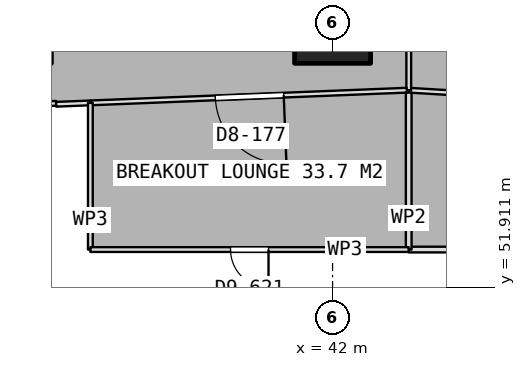
"""IFC4 building model, lengths in metres.
Left out: names, types, materials, properties, quantities, classifications, styles, units other than length and angle.
Written with IfcOpenShell. Run it as: python <this file> out.ifc"""

import sys

from ifc_helpers import new_model, si_unit, direction, frame, frame_2d, origin, origin_2d, place, context, subcontext, project, spatial, rectangle, extrude, element, fill, save


model = new_model("IFC4")
c1 = context("Model", 3, precision=1e-05, world=origin(), true_north=direction((0.0, 1.0)))
c2 = subcontext(c1, "Body", "Model", "MODEL_VIEW")
j1 = project(units=[si_unit("LENGTHUNIT", "METRE"), si_unit("PLANEANGLEUNIT", "RADIAN")], contexts=[c1])
p1 = place(None, origin())
s1 = spatial("IfcSite", under=j1, at=p1, CompositionType="ELEMENT")
p2 = place(p1, origin())
s2 = spatial("IfcBuilding", under=s1, at=p2, CompositionType="ELEMENT")
p3 = place(p2, frame((0.0, 0.0, 151.55)))
s3 = spatial("IfcBuildingStorey", under=s2, at=p3, CompositionType="ELEMENT", Elevation=151.55)
p4 = place(p3, frame((42.0, 58.8, 0.0), z_axis=(0.0, 0.0, 1.0), x_axis=(1.0, 0.0, 0.0)))
e1 = element("IfcColumn", 1, at=p4, inside=s3, PredefinedType="COLUMN", context=c2, shape_type="SweptSolid", body=[
    extrude(rectangle(XDim=2.0, YDim=2.0, at=origin_2d()), origin(), (0.0, 0.0, 1.0), 3.75),
])
p5 = place(p3, frame((51.643, 56.634, 0.0), z_axis=(0.0, 0.0, 1.0), x_axis=(-0.998199883252, 0.059974937057, 0.0)))
e2 = element("IfcWall", 2, at=p5, inside=s3, PredefinedType="PARTITIONING", context=c2, shape_type="SweptSolid", body=[
    extrude(rectangle(XDim=7.653, YDim=0.125, at=frame_2d((3.826, 0.0))), origin(), (0.0, 0.0, 1.0), 3.5),
])
p6 = place(p5, frame((3.326, 0.0, 0.0)))
e3 = element("IfcOpeningElement", 3, at=p6, cuts=e2, PredefinedType="OPENING", context=c2, shape_type="SweptSolid", body=[
    extrude(rectangle(XDim=1.0, YDim=2.1, at=frame_2d((0.5, 1.05))), frame((0.0, 0.073, 0.0), z_axis=(0.0, -1.0, 0.0), x_axis=(1.0, 0.0, 0.0)), (0.0, 0.0, 1.0), 0.145),
])
p7 = place(p3, frame((44.004, 57.093, 0.0), z_axis=(0.0, 0.0, 1.0), x_axis=(0.0, 1.0, 0.0)))
e4 = element("IfcWall", 4, at=p7, inside=s3, PredefinedType="PARTITIONING", context=c2, shape_type="SweptSolid", body=[
    extrude(rectangle(XDim=4.726, YDim=0.125, at=frame_2d((2.363, 0.0))), origin(), (0.0, 0.0, 1.0), 3.5),
])
p8 = place(p3, frame((53.2, 52.9, 0.0), z_axis=(0.0, 0.0, 1.0), x_axis=(-1.0, 0.0, 0.0)))
e5 = element("IfcWall", 5, at=p8, inside=s3, PredefinedType="PARTITIONING", context=c2, shape_type="SweptSolid", body=[
    extrude(rectangle(XDim=9.197, YDim=0.15, at=frame_2d((4.599, 0.0))), origin(), (0.0, 0.0, 1.0), 3.5),
])
p9 = place(p3, frame((44.003, 52.9, 0.0), z_axis=(0.0, 0.0, 1.0), x_axis=(0.0, 1.0, 0.0)))
e6 = element("IfcWall", 6, at=p9, inside=s3, PredefinedType="PARTITIONING", context=c2, shape_type="SweptSolid", body=[
    extrude(rectangle(XDim=4.13, YDim=0.15, at=frame_2d((2.065, 0.0))), origin(), (0.0, 0.0, 1.0), 3.5),
])
p10 = place(p3, frame((34.726, 56.748, 0.0), z_axis=(0.0, 0.0, 1.0), x_axis=(-0.999225898229, -0.039339602292, 0.0)))
e7 = element("IfcWall", 7, at=p10, inside=s3, PredefinedType="PARTITIONING", context=c2, shape_type="SweptSolid", body=[
    extrude(rectangle(XDim=0.838, YDim=0.125, at=frame_2d((0.419, 0.0))), origin(), (0.0, 0.0, 1.0), 3.5),
])
p11 = place(p3, frame((43.953, 57.093, 0.0), z_axis=(0.0, 0.0, 1.0), x_axis=(-0.999196600525, -0.040076844915, 0.0)))
e8 = element("IfcWall", 8, at=p11, inside=s3, PredefinedType="PARTITIONING", context=c2, shape_type="SweptSolid", body=[
    extrude(rectangle(XDim=8.333, YDim=0.125, at=frame_2d((4.167, 0.0))), origin(), (0.0, 0.0, 1.0), 3.5),
])
p12 = place(p11, frame((3.242, 0.0, 0.0)))
e9 = element("IfcOpeningElement", 9, at=p12, cuts=e8, PredefinedType="OPENING", context=c2, shape_type="SweptSolid", body=[
    extrude(rectangle(XDim=1.8, YDim=2.1, at=frame_2d((0.9, 1.05))), frame((0.0, 0.073, 0.0), z_axis=(0.0, -1.0, 0.0), x_axis=(1.0, 0.0, 0.0)), (0.0, 0.0, 1.0), 0.145),
])
p13 = place(p3, frame((35.626, 56.759, 0.0), z_axis=(0.0, 0.0, 1.0), x_axis=(-0.999194884772, -0.04011959928, 0.0)))
e10 = element("IfcWall", 10, at=p13, inside=s3, PredefinedType="PARTITIONING", context=c2, shape_type="SweptSolid", body=[
    extrude(rectangle(XDim=0.901, YDim=0.125, at=frame_2d((0.45, 0.0))), origin(), (0.0, 0.0, 1.0), 3.5),
])
p14 = place(p3, frame((35.626, 52.9, 0.0), z_axis=(0.0, 0.0, 1.0), x_axis=(0.0, 1.0, 0.0)))
e11 = element("IfcWall", 11, at=p14, inside=s3, PredefinedType="PARTITIONING", context=c2, shape_type="SweptSolid", body=[
    extrude(rectangle(XDim=3.859, YDim=0.125, at=frame_2d((1.93, 0.0))), origin(), (0.0, 0.0, 1.0), 3.5),
])
p15 = place(p3, frame((44.003, 52.9, 0.0), z_axis=(0.0, 0.0, 1.0), x_axis=(-1.0, 0.0, 0.0)))
e12 = element("IfcWall", 12, at=p15, inside=s3, PredefinedType="PARTITIONING", context=c2, shape_type="SweptSolid", body=[
    extrude(rectangle(XDim=8.377, YDim=0.125, at=frame_2d((4.188, 0.0))), origin(), (0.0, 0.0, 1.0), 3.5),
])
p16 = place(p15, frame((3.689, 0.0, 0.0)))
e13 = element("IfcOpeningElement", 13, at=p16, cuts=e12, PredefinedType="OPENING", context=c2, shape_type="SweptSolid", body=[
    extrude(rectangle(XDim=1.0, YDim=2.1, at=frame_2d((0.5, 1.05))), frame((0.0, 0.073, 0.0), z_axis=(0.0, -1.0, 0.0), x_axis=(1.0, 0.0, 0.0)), (0.0, 0.0, 1.0), 0.145),
])
p17 = place(p16, origin())
e14 = element("IfcDoor", 14, at=p17, inside=s3, OperationType="SINGLE_SWING_LEFT", PredefinedType="DOOR", context=c2, shape_type="SweptSolid", body=[
    extrude(rectangle(XDim=1.0, YDim=2.1, at=frame_2d((0.5, 1.05))), frame((0.0, 0.025, 0.0), z_axis=(0.0, -1.0, 0.0), x_axis=(1.0, 0.0, 0.0)), (0.0, 0.0, 1.0), 0.05),
])
fill(e13, e14)
p18 = place(p12, origin())
e15 = element("IfcDoor", 15, at=p18, inside=s3, OperationType="DOUBLE_DOOR_SINGLE_SWING", PredefinedType="DOOR", context=c2, shape_type="SweptSolid", body=[
    extrude(rectangle(XDim=1.8, YDim=2.1, at=frame_2d((0.9, 1.05))), frame((0.0, 0.025, 0.0), z_axis=(0.0, -1.0, 0.0), x_axis=(1.0, 0.0, 0.0)), (0.0, 0.0, 1.0), 0.05),
])
fill(e9, e15)
save(model, sys.argv[1])
